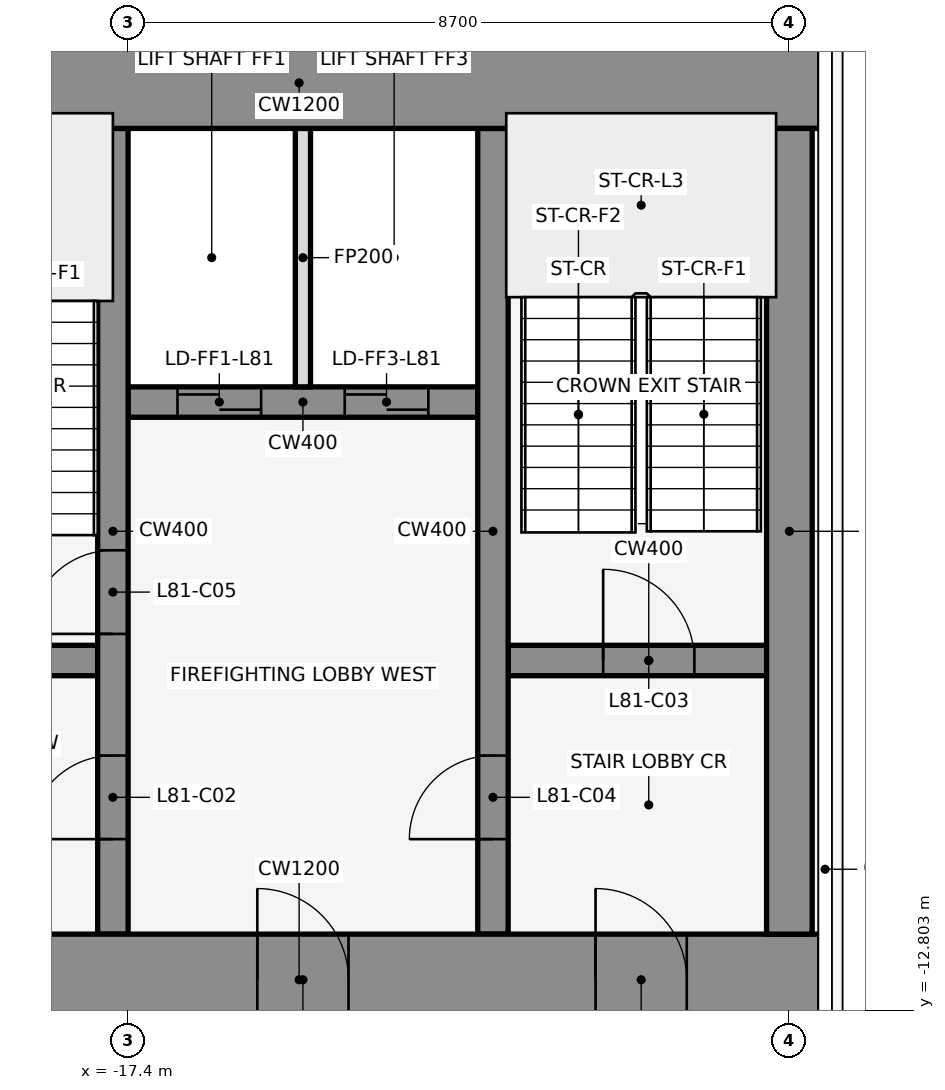
"""IFC4 building model, lengths in metres.
Left out: names, types, materials, properties, quantities, classifications, styles, units other than length and angle.
Written with IfcOpenShell. Run it as: python <this file> out.ifc"""

import sys

from ifc_helpers import new_model, si_unit, direction, frame, frame_2d, origin, place, context, subcontext, project, spatial, rectangle, extrude, element, fill, save


model = new_model("IFC4")
c1 = context("Model", 3, precision=1e-05, world=origin(), true_north=direction((0.0, 1.0)))
c2 = subcontext(c1, "Body", "Model", "MODEL_VIEW")
j1 = project(units=[si_unit("LENGTHUNIT", "METRE"), si_unit("PLANEANGLEUNIT", "RADIAN")], contexts=[c1])
p1 = place(None, origin())
s1 = spatial("IfcSite", under=j1, at=p1, CompositionType="ELEMENT")
p2 = place(p1, origin())
s2 = spatial("IfcBuilding", under=s1, at=p2, CompositionType="ELEMENT")
p3 = place(p2, frame((0.0, 0.0, 361.4)))
s3 = spatial("IfcBuildingStorey", under=s2, at=p3, CompositionType="ELEMENT", Elevation=361.4)
p4 = place(p3, frame((-20.8, -8.2, 0.0), z_axis=(0.0, 0.0, 1.0), x_axis=(1.0, 0.0, 0.0)))
e1 = element("IfcWall", 1, at=p4, inside=s3, PredefinedType="SHEAR", context=c2, shape_type="SweptSolid", body=[
    extrude(rectangle(XDim=3.0, YDim=0.4, at=frame_2d((1.5, 0.0))), origin(), (0.0, 0.0, 1.0), 4.5),
])
p5 = place(p4, frame((0.85, 0.0, 0.0)))
e2 = element("IfcOpeningElement", 2, at=p5, cuts=e1, PredefinedType="OPENING", context=c2, shape_type="SweptSolid", body=[
    extrude(rectangle(XDim=1.2, YDim=2.1, at=frame_2d((0.6, 1.05))), frame((0.0, 0.212, 0.0), z_axis=(0.0, -1.0, 0.0), x_axis=(1.0, 0.0, 0.0)), (0.0, 0.0, 1.0), 0.424),
])
p6 = place(p3, frame((-12.4, -8.2, 0.0), z_axis=(0.0, 0.0, 1.0), x_axis=(1.0, 0.0, 0.0)))
e3 = element("IfcWall", 3, at=p6, inside=s3, PredefinedType="SHEAR", context=c2, shape_type="SweptSolid", body=[
    extrude(rectangle(XDim=3.7, YDim=0.4, at=frame_2d((1.85, 0.0))), origin(), (0.0, 0.0, 1.0), 4.5),
])
p7 = place(p6, frame((1.25, 0.0, 0.0)))
e4 = element("IfcOpeningElement", 4, at=p7, cuts=e3, PredefinedType="OPENING", context=c2, shape_type="SweptSolid", body=[
    extrude(rectangle(XDim=1.2, YDim=2.1, at=frame_2d((0.6, 1.05))), frame((0.0, 0.212, 0.0), z_axis=(0.0, -1.0, 0.0), x_axis=(1.0, 0.0, 0.0)), (0.0, 0.0, 1.0), 0.424),
])
p8 = place(p3, frame((-17.4, -4.8, 0.0), z_axis=(0.0, 0.0, 1.0), x_axis=(1.0, 0.0, 0.0)))
e5 = element("IfcWall", 5, at=p8, inside=s3, PredefinedType="SHEAR", context=c2, shape_type="SweptSolid", body=[
    extrude(rectangle(XDim=4.6, YDim=0.4, at=frame_2d((2.3, 0.0))), origin(), (0.0, 0.0, 1.0), 4.5),
])
p9 = place(p8, frame((0.65, 0.0, 0.0)))
e6 = element("IfcOpeningElement", 6, at=p9, cuts=e5, PredefinedType="OPENING", context=c2, shape_type="SweptSolid", body=[
    extrude(rectangle(XDim=1.1, YDim=2.1, at=frame_2d((0.55, 1.05))), frame((0.0, 0.212, 0.0), z_axis=(0.0, -1.0, 0.0), x_axis=(1.0, 0.0, 0.0)), (0.0, 0.0, 1.0), 0.424),
])
p10 = place(p8, frame((2.85, 0.0, 0.0)))
e7 = element("IfcOpeningElement", 7, at=p10, cuts=e5, PredefinedType="OPENING", context=c2, shape_type="SweptSolid", body=[
    extrude(rectangle(XDim=1.1, YDim=2.1, at=frame_2d((0.55, 1.05))), frame((0.0, 0.212, 0.0), z_axis=(0.0, -1.0, 0.0), x_axis=(1.0, 0.0, 0.0)), (0.0, 0.0, 1.0), 0.424),
])
p11 = place(p3, frame((-17.6, -11.8, 0.0), z_axis=(0.0, 0.0, 1.0), x_axis=(0.0, 1.0, 0.0)))
e8 = element("IfcWall", 8, at=p11, inside=s3, PredefinedType="SHEAR", context=c2, shape_type="SweptSolid", body=[
    extrude(rectangle(XDim=10.6, YDim=0.4, at=frame_2d((5.3, 0.0))), origin(), (0.0, 0.0, 1.0), 4.5),
])
p12 = place(p11, frame((1.25, 0.0, 0.0)))
e9 = element("IfcOpeningElement", 9, at=p12, cuts=e8, PredefinedType="OPENING", context=c2, shape_type="SweptSolid", body=[
    extrude(rectangle(XDim=1.1, YDim=2.1, at=frame_2d((0.55, 1.05))), frame((0.0, 0.212, 0.0), z_axis=(0.0, -1.0, 0.0), x_axis=(1.0, 0.0, 0.0)), (0.0, 0.0, 1.0), 0.424),
])
p13 = place(p11, frame((3.95, 0.0, 0.0)))
e10 = element("IfcOpeningElement", 10, at=p13, cuts=e8, PredefinedType="OPENING", context=c2, shape_type="SweptSolid", body=[
    extrude(rectangle(XDim=1.1, YDim=2.1, at=frame_2d((0.55, 1.05))), frame((0.0, 0.212, 0.0), z_axis=(0.0, -1.0, 0.0), x_axis=(1.0, 0.0, 0.0)), (0.0, 0.0, 1.0), 0.424),
])
p14 = place(p3, frame((-15.1, -4.6, 0.0), z_axis=(0.0, 0.0, 1.0), x_axis=(0.0, 1.0, 0.0)))
e11 = element("IfcWall", 11, at=p14, inside=s3, PredefinedType="PARTITIONING", context=c2, shape_type="SweptSolid", body=[
    extrude(rectangle(XDim=3.4, YDim=0.2, at=frame_2d((1.7, 0.0))), origin(), (0.0, 0.0, 1.0), 3.368),
])
p15 = place(p3, frame((-12.6, -11.8, 0.0), z_axis=(0.0, 0.0, 1.0), x_axis=(0.0, 1.0, 0.0)))
e12 = element("IfcWall", 12, at=p15, inside=s3, PredefinedType="SHEAR", context=c2, shape_type="SweptSolid", body=[
    extrude(rectangle(XDim=10.6, YDim=0.4, at=frame_2d((5.3, 0.0))), origin(), (0.0, 0.0, 1.0), 4.5),
])
p16 = place(p15, frame((1.25, 0.0, 0.0)))
e13 = element("IfcOpeningElement", 13, at=p16, cuts=e12, PredefinedType="OPENING", context=c2, shape_type="SweptSolid", body=[
    extrude(rectangle(XDim=1.1, YDim=2.1, at=frame_2d((0.55, 1.05))), frame((0.0, 0.212, 0.0), z_axis=(0.0, -1.0, 0.0), x_axis=(1.0, 0.0, 0.0)), (0.0, 0.0, 1.0), 0.424),
])
p17 = place(p3, frame((-22.0, -0.6, 0.0), z_axis=(0.0, 0.0, 1.0), x_axis=(1.0, 0.0, 0.0)))
e14 = element("IfcWall", 14, at=p17, inside=s3, PredefinedType="SHEAR", context=c2, shape_type="SweptSolid", body=[
    extrude(rectangle(XDim=13.7, YDim=1.2, at=frame_2d((6.85, 0.0))), origin(), (0.0, 0.0, 1.0), 4.5),
])
p18 = place(p3, frame((-22.0, -12.4, 0.0), z_axis=(0.0, 0.0, 1.0), x_axis=(1.0, 0.0, 0.0)))
e15 = element("IfcWall", 15, at=p18, inside=s3, PredefinedType="SHEAR", context=c2, shape_type="SweptSolid", body=[
    extrude(rectangle(XDim=13.7, YDim=1.2, at=frame_2d((6.85, 0.0))), origin(), (0.0, 0.0, 1.0), 4.5),
])
p19 = place(p18, frame((2.2, 0.0, 0.0)))
e16 = element("IfcOpeningElement", 16, at=p19, cuts=e15, PredefinedType="OPENING", context=c2, shape_type="SweptSolid", body=[
    extrude(rectangle(XDim=1.2, YDim=2.1, at=frame_2d((0.6, 1.05))), frame((0.0, 0.612, 0.0), z_axis=(0.0, -1.0, 0.0), x_axis=(1.0, 0.0, 0.0)), (0.0, 0.0, 1.0), 1.224),
])
p20 = place(p18, frame((10.75, 0.0, 0.0)))
e17 = element("IfcOpeningElement", 17, at=p20, cuts=e15, PredefinedType="OPENING", context=c2, shape_type="SweptSolid", body=[
    extrude(rectangle(XDim=1.2, YDim=2.1, at=frame_2d((0.6, 1.05))), frame((0.0, 0.612, 0.0), z_axis=(0.0, -1.0, 0.0), x_axis=(1.0, 0.0, 0.0)), (0.0, 0.0, 1.0), 1.224),
])
p21 = place(p18, frame((6.3, 0.0, 0.0)))
e18 = element("IfcOpeningElement", 18, at=p21, cuts=e15, PredefinedType="OPENING", context=c2, shape_type="SweptSolid", body=[
    extrude(rectangle(XDim=1.2, YDim=2.1, at=frame_2d((0.6, 1.05))), frame((0.0, 0.612, 0.0), z_axis=(0.0, -1.0, 0.0), x_axis=(1.0, 0.0, 0.0)), (0.0, 0.0, 1.0), 1.224),
])
p22 = place(p3, frame((-8.7, -11.8, 0.0), z_axis=(0.0, 0.0, 1.0), x_axis=(0.0, 1.0, 0.0)))
e19 = element("IfcWall", 19, at=p22, inside=s3, PredefinedType="SHEAR", context=c2, shape_type="SweptSolid", body=[
    extrude(rectangle(XDim=10.6, YDim=0.6, at=frame_2d((5.3, 0.0))), origin(), (0.0, 0.0, 1.0), 4.5),
])
p23 = place(p12, frame((1.1, 0.0, 0.0), z_axis=(0.0, 0.0, 1.0), x_axis=(-1.0, 0.0, 0.0)))
e20 = element("IfcDoor", 20, at=p23, inside=s3, OperationType="SINGLE_SWING_LEFT", PredefinedType="DOOR", context=c2, shape_type="SweptSolid", body=[
    extrude(rectangle(XDim=1.1, YDim=2.1, at=frame_2d((0.55, 1.05))), frame((0.0, 0.025, 0.0), z_axis=(0.0, -1.0, 0.0), x_axis=(1.0, 0.0, 0.0)), (0.0, 0.0, 1.0), 0.05),
])
fill(e9, e20)
p24 = place(p7, origin())
e21 = element("IfcDoor", 21, at=p24, inside=s3, OperationType="SINGLE_SWING_LEFT", PredefinedType="DOOR", context=c2, shape_type="SweptSolid", body=[
    extrude(rectangle(XDim=1.2, YDim=2.1, at=frame_2d((0.6, 1.05))), frame((0.0, 0.025, 0.0), z_axis=(0.0, -1.0, 0.0), x_axis=(1.0, 0.0, 0.0)), (0.0, 0.0, 1.0), 0.05),
])
fill(e4, e21)
p25 = place(p16, origin())
e22 = element("IfcDoor", 22, at=p25, inside=s3, OperationType="SINGLE_SWING_RIGHT", PredefinedType="DOOR", context=c2, shape_type="SweptSolid", body=[
    extrude(rectangle(XDim=1.1, YDim=2.1, at=frame_2d((0.55, 1.05))), frame((0.0, 0.025, 0.0), z_axis=(0.0, -1.0, 0.0), x_axis=(1.0, 0.0, 0.0)), (0.0, 0.0, 1.0), 0.05),
])
fill(e13, e22)
p26 = place(p9, origin())
e23 = element("IfcDoor", 23, at=p26, inside=s3, OperationType="DOUBLE_DOOR_SLIDING", PredefinedType="DOOR", context=c2, shape_type="SweptSolid", body=[
    extrude(rectangle(XDim=1.1, YDim=2.1, at=frame_2d((0.55, 1.05))), frame((0.0, 0.025, 0.0), z_axis=(0.0, -1.0, 0.0), x_axis=(1.0, 0.0, 0.0)), (0.0, 0.0, 1.0), 0.05),
])
fill(e6, e23)
p27 = place(p10, origin())
e24 = element("IfcDoor", 24, at=p27, inside=s3, OperationType="DOUBLE_DOOR_SLIDING", PredefinedType="DOOR", context=c2, shape_type="SweptSolid", body=[
    extrude(rectangle(XDim=1.1, YDim=2.1, at=frame_2d((0.55, 1.05))), frame((0.0, 0.025, 0.0), z_axis=(0.0, -1.0, 0.0), x_axis=(1.0, 0.0, 0.0)), (0.0, 0.0, 1.0), 0.05),
])
fill(e7, e24)
p28 = place(p13, frame((1.1, 0.0, 0.0), z_axis=(0.0, 0.0, 1.0), x_axis=(-1.0, 0.0, 0.0)))
e25 = element("IfcDoor", 25, at=p28, inside=s3, OperationType="SINGLE_SWING_RIGHT", PredefinedType="DOOR", context=c2, shape_type="SweptSolid", body=[
    extrude(rectangle(XDim=1.1, YDim=2.1, at=frame_2d((0.55, 1.05))), frame((0.0, 0.025, 0.0), z_axis=(0.0, -1.0, 0.0), x_axis=(1.0, 0.0, 0.0)), (0.0, 0.0, 1.0), 0.05),
])
fill(e10, e25)
p29 = place(p20, frame((1.2, 0.0, 0.0), z_axis=(0.0, 0.0, 1.0), x_axis=(-1.0, 0.0, 0.0)))
e26 = element("IfcDoor", 26, at=p29, inside=s3, OperationType="SINGLE_SWING_RIGHT", PredefinedType="DOOR", context=c2, shape_type="SweptSolid", body=[
    extrude(rectangle(XDim=1.2, YDim=2.1, at=frame_2d((0.6, 1.05))), frame((0.0, 0.025, 0.0), z_axis=(0.0, -1.0, 0.0), x_axis=(1.0, 0.0, 0.0)), (0.0, 0.0, 1.0), 0.05),
])
fill(e17, e26)
p30 = place(p21, frame((1.2, 0.0, 0.0), z_axis=(0.0, 0.0, 1.0), x_axis=(-1.0, 0.0, 0.0)))
e27 = element("IfcDoor", 27, at=p30, inside=s3, OperationType="SINGLE_SWING_RIGHT", PredefinedType="DOOR", context=c2, shape_type="SweptSolid", body=[
    extrude(rectangle(XDim=1.2, YDim=2.1, at=frame_2d((0.6, 1.05))), frame((0.0, 0.025, 0.0), z_axis=(0.0, -1.0, 0.0), x_axis=(1.0, 0.0, 0.0)), (0.0, 0.0, 1.0), 0.05),
])
fill(e18, e27)
save(model, sys.argv[1])
